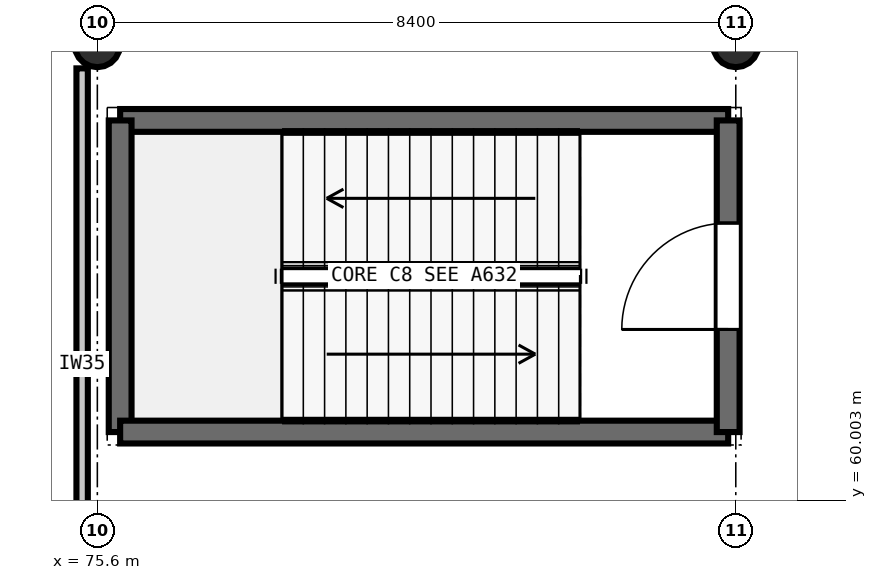
"""IFC4 building model, lengths in metres.
Left out: names, types, materials, properties, quantities, classifications, styles, units other than length and angle.
Written with IfcOpenShell. Run it as: python <this file> out.ifc"""

import sys

from ifc_helpers import new_model, si_unit, direction, frame, frame_2d, origin, origin_2d, place, context, subcontext, project, spatial, rectangle, circle, extrude, element, fill, save


model = new_model("IFC4")
c1 = context("Model", 3, precision=1e-05, world=origin(), true_north=direction((0.0, 1.0)))
c2 = subcontext(c1, "Body", "Model", "MODEL_VIEW")
j1 = project(units=[si_unit("LENGTHUNIT", "METRE"), si_unit("PLANEANGLEUNIT", "RADIAN")], contexts=[c1])
p1 = place(None, origin())
s1 = spatial("IfcSite", under=j1, at=p1, CompositionType="ELEMENT")
p2 = place(p1, origin())
s2 = spatial("IfcBuilding", under=s1, at=p2, CompositionType="ELEMENT")
p3 = place(p2, origin())
s3 = spatial("IfcBuildingStorey", under=s2, at=p3, CompositionType="ELEMENT", Elevation=0.0)
for number, where, z_axis, x_axis in (
    (1, (75.6, 66.0, 0.0), (0.0, 0.0, 1.0), (1.0, 0.0, 0.0)),
    (2, (84.0, 66.0, 0.0), (0.0, 0.0, 1.0), (1.0, 0.0, 0.0)),
):
    element("IfcColumn", number, at=place(p3, frame(where, z_axis=z_axis, x_axis=x_axis)), inside=s3, PredefinedType="COLUMN", context=c2, shape_type="SweptSolid", body=[
        extrude(circle(Radius=0.3, at=origin_2d()), origin(), (0.0, 0.0, 1.0), 5.4),
    ])
p4 = place(p3, frame((83.9, 65.0, 0.0), z_axis=(0.0, 0.0, 1.0), x_axis=(-1.0, 0.0, 0.0)))
e3 = element("IfcWall", 3, at=p4, inside=s3, PredefinedType="SHEAR", context=c2, shape_type="SweptSolid", body=[
    extrude(rectangle(XDim=8.0, YDim=0.3, at=frame_2d((4.0, 0.0))), origin(), (0.0, 0.0, 1.0), 5.4),
])
p5 = place(p3, frame((75.9, 65.0, 0.0), z_axis=(0.0, 0.0, 1.0), x_axis=(0.0, -1.0, 0.0)))
e4 = element("IfcWall", 4, at=p5, inside=s3, PredefinedType="SHEAR", context=c2, shape_type="SweptSolid", body=[
    extrude(rectangle(XDim=4.1, YDim=0.3, at=frame_2d((2.05, 0.0))), origin(), (0.0, 0.0, 1.0), 5.4),
])
p6 = place(p3, frame((75.9, 60.9, 0.0), z_axis=(0.0, 0.0, 1.0), x_axis=(1.0, 0.0, 0.0)))
e5 = element("IfcWall", 5, at=p6, inside=s3, PredefinedType="SHEAR", context=c2, shape_type="SweptSolid", body=[
    extrude(rectangle(XDim=8.0, YDim=0.3, at=frame_2d((4.0, 0.0))), origin(), (0.0, 0.0, 1.0), 5.4),
])
p7 = place(p3, frame((83.9, 60.9, 0.0), z_axis=(0.0, 0.0, 1.0), x_axis=(0.0, 1.0, 0.0)))
e6 = element("IfcWall", 6, at=p7, inside=s3, PredefinedType="SHEAR", context=c2, shape_type="SweptSolid", body=[
    extrude(rectangle(XDim=4.1, YDim=0.3, at=frame_2d((2.05, 0.0))), origin(), (0.0, 0.0, 1.0), 5.4),
])
p8 = place(p7, frame((1.35, 0.0, 0.0)))
e7 = element("IfcOpeningElement", 7, at=p8, cuts=e6, PredefinedType="OPENING", context=c2, shape_type="SweptSolid", body=[
    extrude(rectangle(XDim=1.4, YDim=2.2, at=frame_2d((0.7, 1.1))), frame((0.0, 0.16, 0.0), z_axis=(0.0, -1.0, 0.0), x_axis=(1.0, 0.0, 0.0)), (0.0, 0.0, 1.0), 0.32),
])
p9 = place(p3, frame((75.4, 57.915, 0.0), z_axis=(0.0, 0.0, 1.0), x_axis=(0.0, 1.0, 0.0)))
e8 = element("IfcWall", 8, at=p9, inside=s3, PredefinedType="PARTITIONING", context=c2, shape_type="SweptSolid", body=[
    extrude(rectangle(XDim=7.77, YDim=0.15, at=frame_2d((3.885, 0.0))), origin(), (0.0, 0.0, 1.0), 4.685),
])
p10 = place(p8, origin())
e9 = element("IfcDoor", 9, at=p10, inside=s3, OperationType="SINGLE_SWING_LEFT", PredefinedType="DOOR", context=c2, shape_type="SweptSolid", body=[
    extrude(rectangle(XDim=1.4, YDim=2.2, at=frame_2d((0.7, 1.1))), frame((0.0, 0.025, 0.0), z_axis=(0.0, -1.0, 0.0), x_axis=(1.0, 0.0, 0.0)), (0.0, 0.0, 1.0), 0.05),
])
fill(e7, e9)
save(model, sys.argv[1])
